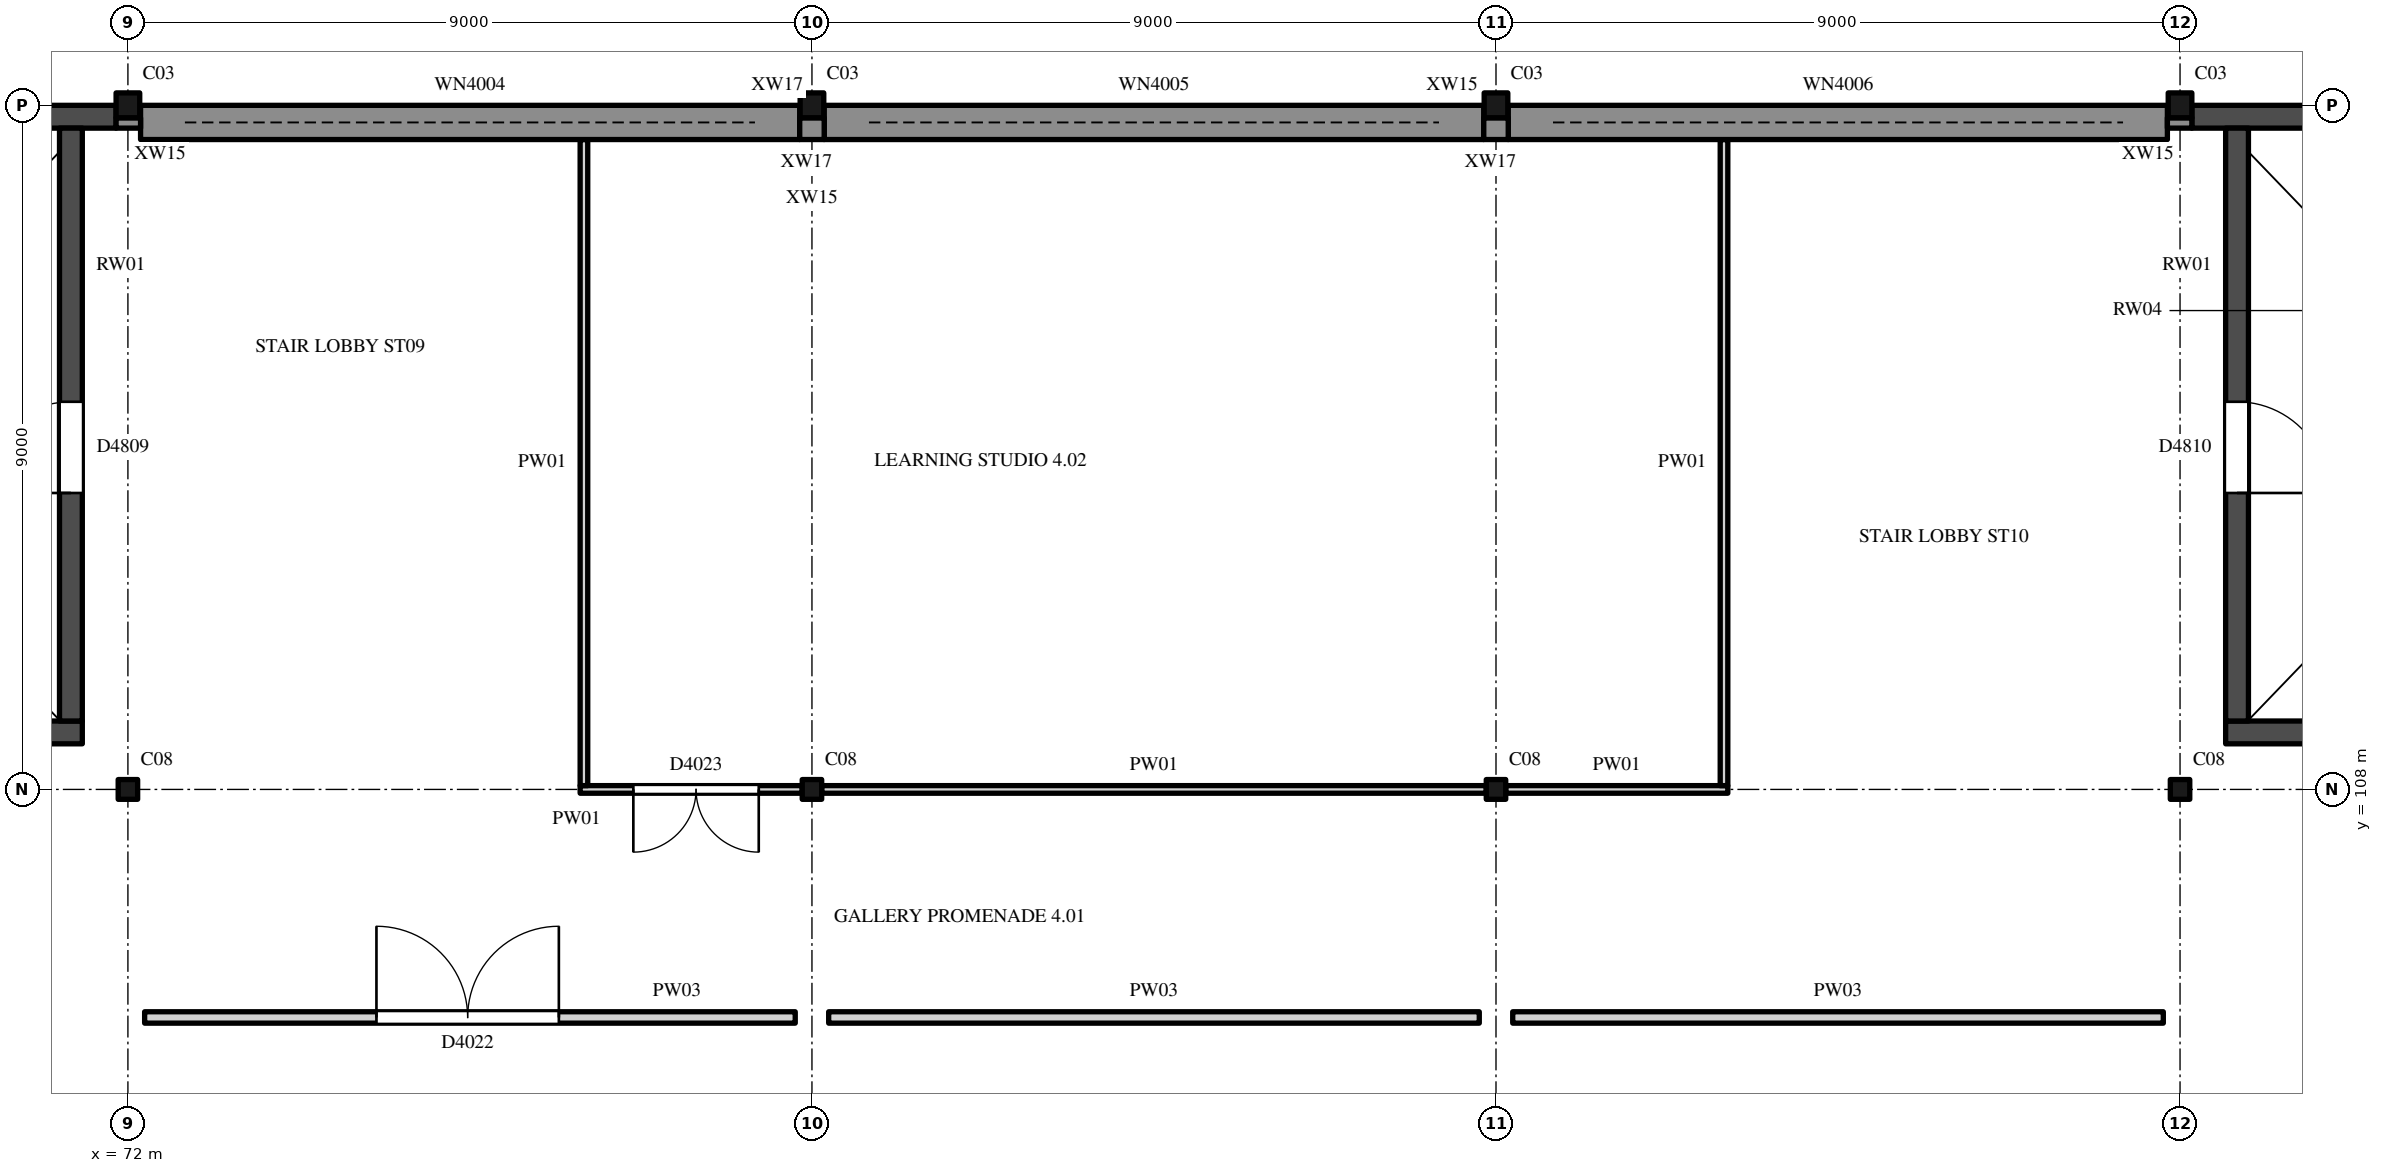
"""IFC4 building model, lengths in metres.
Left out: names, types, materials, properties, quantities, classifications, styles, units other than length and angle.
Written with IfcOpenShell. Run it as: python <this file> out.ifc"""

import sys

from ifc_helpers import new_model, si_unit, direction, frame, frame_2d, origin, origin_2d, place, context, subcontext, project, spatial, rectangle, i_section, extrude, element, fill, save


model = new_model("IFC4")
c1 = context("Model", 3, precision=1e-05, world=origin(), true_north=direction((0.0, 1.0)))
c2 = subcontext(c1, "Body", "Model", "MODEL_VIEW")
j1 = project(units=[si_unit("LENGTHUNIT", "METRE"), si_unit("PLANEANGLEUNIT", "RADIAN")], contexts=[c1])
p1 = place(None, origin())
s1 = spatial("IfcSite", under=j1, at=p1, CompositionType="ELEMENT")
p2 = place(p1, origin())
s2 = spatial("IfcBuilding", under=s1, at=p2, CompositionType="ELEMENT")
p3 = place(p2, frame((0.0, 0.0, 26.0)))
s3 = spatial("IfcBuildingStorey", under=s2, at=p3, CompositionType="ELEMENT", Elevation=26.0)
for number, where, z_axis, x_axis in (
    (1, (72.0, 108.0, 0.0), (0.0, 0.0, 1.0), (1.0, 0.0, 0.0)),
    (2, (81.0, 108.0, 0.0), (0.0, 0.0, 1.0), (1.0, 0.0, 0.0)),
    (3, (90.0, 108.0, 0.0), (0.0, 0.0, 1.0), (1.0, 0.0, 0.0)),
    (4, (99.0, 108.0, 0.0), (0.0, 0.0, 1.0), (1.0, 0.0, 0.0)),
):
    element("IfcColumn", number, at=place(p3, frame(where, z_axis=z_axis, x_axis=x_axis)), inside=s3, PredefinedType="COLUMN", context=c2, shape_type="SweptSolid", body=[
        extrude(i_section(OverallWidth=0.256, OverallDepth=0.26, WebThickness=0.01, FlangeThickness=0.017, FilletRadius=0.014, at=origin_2d()), origin(), (0.0, 0.0, 1.0), 5.0),
    ])
for number, where, z_axis, x_axis in (
    (5, (72.0, 117.0, 0.0), (0.0, 0.0, 1.0), (1.0, 0.0, 0.0)),
    (6, (81.0, 117.0, 0.0), (0.0, 0.0, 1.0), (1.0, 0.0, 0.0)),
    (7, (90.0, 117.0, 0.0), (0.0, 0.0, 1.0), (1.0, 0.0, 0.0)),
    (8, (99.0, 117.0, 0.0), (0.0, 0.0, 1.0), (1.0, 0.0, 0.0)),
):
    element("IfcColumn", number, at=place(p3, frame(where, z_axis=z_axis, x_axis=x_axis)), inside=s3, PredefinedType="COLUMN", context=c2, shape_type="SweptSolid", body=[
        extrude(i_section(OverallWidth=0.311, OverallDepth=0.327, WebThickness=0.016, FlangeThickness=0.025, FilletRadius=0.017, at=origin_2d()), origin(), (0.0, 0.0, 1.0), 5.0),
    ])
p4 = place(p3, frame((63.6, 108.75, 0.0), z_axis=(0.0, 0.0, 1.0), x_axis=(1.0, 0.0, 0.0)))
e9 = element("IfcWall", 9, at=p4, inside=s3, PredefinedType="SHEAR", context=c2, shape_type="SweptSolid", body=[
    extrude(rectangle(XDim=7.8, YDim=0.3, at=frame_2d((3.9, 0.0))), origin(), (0.0, 0.0, 1.0), 5.0),
])
p5 = place(p3, frame((63.156, 116.85, 0.0), z_axis=(0.0, 0.0, 1.0), x_axis=(1.0, 0.0, 0.0)))
e10 = element("IfcWall", 10, at=p5, inside=s3, PredefinedType="SHEAR", context=c2, shape_type="SweptSolid", body=[
    extrude(rectangle(XDim=8.689, YDim=0.3, at=frame_2d((4.344, 0.0))), origin(), (0.0, 0.0, 1.0), 5.0),
])
p6 = place(p3, frame((71.25, 108.9, 0.0), z_axis=(0.0, 0.0, 1.0), x_axis=(0.0, 1.0, 0.0)))
e11 = element("IfcWall", 11, at=p6, inside=s3, PredefinedType="SHEAR", context=c2, shape_type="SweptSolid", body=[
    extrude(rectangle(XDim=7.8, YDim=0.3, at=frame_2d((3.9, 0.0))), origin(), (0.0, 0.0, 1.0), 5.0),
])
p7 = place(p6, frame((3.0, 0.0, 0.0)))
e12 = element("IfcOpeningElement", 12, at=p7, cuts=e11, PredefinedType="OPENING", context=c2, shape_type="SweptSolid", body=[
    extrude(rectangle(XDim=1.2, YDim=2.1, at=frame_2d((0.6, 1.05))), frame((0.0, 0.16, 0.0), z_axis=(0.0, -1.0, 0.0), x_axis=(1.0, 0.0, 0.0)), (0.0, 0.0, 1.0), 0.32),
])
p8 = place(p3, frame((99.6, 108.75, 0.0), z_axis=(0.0, 0.0, 1.0), x_axis=(1.0, 0.0, 0.0)))
e13 = element("IfcWall", 13, at=p8, inside=s3, PredefinedType="SHEAR", context=c2, shape_type="SweptSolid", body=[
    extrude(rectangle(XDim=7.8, YDim=0.3, at=frame_2d((3.9, 0.0))), origin(), (0.0, 0.0, 1.0), 5.0),
])
p9 = place(p3, frame((99.156, 116.85, 0.0), z_axis=(0.0, 0.0, 1.0), x_axis=(1.0, 0.0, 0.0)))
e14 = element("IfcWall", 14, at=p9, inside=s3, PredefinedType="SHEAR", context=c2, shape_type="SweptSolid", body=[
    extrude(rectangle(XDim=8.689, YDim=0.3, at=frame_2d((4.344, 0.0))), origin(), (0.0, 0.0, 1.0), 5.0),
])
p10 = place(p3, frame((99.75, 108.9, 0.0), z_axis=(0.0, 0.0, 1.0), x_axis=(0.0, 1.0, 0.0)))
e15 = element("IfcWall", 15, at=p10, inside=s3, PredefinedType="SHEAR", context=c2, shape_type="SweptSolid", body=[
    extrude(rectangle(XDim=7.8, YDim=0.3, at=frame_2d((3.9, 0.0))), origin(), (0.0, 0.0, 1.0), 5.0),
])
p11 = place(p10, frame((3.0, 0.0, 0.0)))
e16 = element("IfcOpeningElement", 16, at=p11, cuts=e15, PredefinedType="OPENING", context=c2, shape_type="SweptSolid", body=[
    extrude(rectangle(XDim=1.2, YDim=2.1, at=frame_2d((0.6, 1.05))), frame((0.0, 0.16, 0.0), z_axis=(0.0, -1.0, 0.0), x_axis=(1.0, 0.0, 0.0)), (0.0, 0.0, 1.0), 0.32),
])
p12 = place(p3, frame((72.167, 116.775, 0.0), z_axis=(0.0, 0.0, 1.0), x_axis=(1.0, 0.0, 0.0)))
e17 = element("IfcWall", 17, at=p12, inside=s3, PredefinedType="SOLIDWALL", context=c2, shape_type="SweptSolid", body=[
    extrude(rectangle(XDim=8.673, YDim=0.45, at=frame_2d((4.336, 0.0))), origin(), (0.0, 0.0, 1.0), 4.518),
])
p13 = place(p12, frame((0.583, 0.0, 1.6)))
e18 = element("IfcOpeningElement", 18, at=p13, cuts=e17, PredefinedType="OPENING", context=c2, shape_type="SweptSolid", body=[
    extrude(rectangle(XDim=7.5, YDim=1.2, at=frame_2d((3.75, 0.6))), frame((0.0, 0.235, 0.0), z_axis=(0.0, -1.0, 0.0), x_axis=(1.0, 0.0, 0.0)), (0.0, 0.0, 1.0), 0.47),
])
p14 = place(p3, frame((81.161, 116.775, 0.0), z_axis=(0.0, 0.0, 1.0), x_axis=(1.0, 0.0, 0.0)))
e19 = element("IfcWall", 19, at=p14, inside=s3, PredefinedType="SOLIDWALL", context=c2, shape_type="SweptSolid", body=[
    extrude(rectangle(XDim=8.678, YDim=0.45, at=frame_2d((4.339, 0.0))), origin(), (0.0, 0.0, 1.0), 4.518),
])
p15 = place(p14, frame((0.589, 0.0, 1.6)))
e20 = element("IfcOpeningElement", 20, at=p15, cuts=e19, PredefinedType="OPENING", context=c2, shape_type="SweptSolid", body=[
    extrude(rectangle(XDim=7.5, YDim=1.2, at=frame_2d((3.75, 0.6))), frame((0.0, 0.235, 0.0), z_axis=(0.0, -1.0, 0.0), x_axis=(1.0, 0.0, 0.0)), (0.0, 0.0, 1.0), 0.47),
])
p16 = place(p3, frame((90.161, 116.775, 0.0), z_axis=(0.0, 0.0, 1.0), x_axis=(1.0, 0.0, 0.0)))
e21 = element("IfcWall", 21, at=p16, inside=s3, PredefinedType="SOLIDWALL", context=c2, shape_type="SweptSolid", body=[
    extrude(rectangle(XDim=8.673, YDim=0.45, at=frame_2d((4.336, 0.0))), origin(), (0.0, 0.0, 1.0), 4.518),
])
p17 = place(p16, frame((0.589, 0.0, 1.6)))
e22 = element("IfcOpeningElement", 22, at=p17, cuts=e21, PredefinedType="OPENING", context=c2, shape_type="SweptSolid", body=[
    extrude(rectangle(XDim=7.5, YDim=1.2, at=frame_2d((3.75, 0.6))), frame((0.0, 0.235, 0.0), z_axis=(0.0, -1.0, 0.0), x_axis=(1.0, 0.0, 0.0)), (0.0, 0.0, 1.0), 0.47),
])
p18 = place(p3, frame((71.844, 116.768, 0.0), z_axis=(0.0, 0.0, 1.0), x_axis=(1.0, 0.0, 0.0)))
e23 = element("IfcWall", 23, at=p18, inside=s3, PredefinedType="SOLIDWALL", context=c2, shape_type="SweptSolid", body=[
    extrude(rectangle(XDim=0.322, YDim=0.136, at=frame_2d((0.161, 0.0))), origin(), (0.0, 0.0, 1.0), 5.0),
])
for number, where, z_axis, x_axis in (
    (24, (80.839, 116.693, 0.0), (0.0, 0.0, 1.0), (1.0, 0.0, 0.0)),
    (25, (89.839, 116.693, 0.0), (0.0, 0.0, 1.0), (1.0, 0.0, 0.0)),
):
    element("IfcWall", number, at=place(p3, frame(where, z_axis=z_axis, x_axis=x_axis)), inside=s3, PredefinedType="SOLIDWALL", context=c2, shape_type="SweptSolid", body=[
        extrude(rectangle(XDim=0.322, YDim=0.286, at=frame_2d((0.161, 0.0))), origin(), (0.0, 0.0, 1.0), 4.518),
    ])
p19 = place(p3, frame((98.833, 116.768, 0.0), z_axis=(0.0, 0.0, 1.0), x_axis=(1.0, 0.0, 0.0)))
e26 = element("IfcWall", 26, at=p19, inside=s3, PredefinedType="SOLIDWALL", context=c2, shape_type="SweptSolid", body=[
    extrude(rectangle(XDim=0.322, YDim=0.136, at=frame_2d((0.161, 0.0))), origin(), (0.0, 0.0, 1.0), 5.0),
])
p20 = place(p3, frame((72.22, 105.0, 0.0), z_axis=(0.0, 0.0, 1.0), x_axis=(1.0, 0.0, 0.0)))
e27 = element("IfcWall", 27, at=p20, inside=s3, PredefinedType="PARTITIONING", context=c2, shape_type="SweptSolid", body=[
    extrude(rectangle(XDim=8.56, YDim=0.15, at=frame_2d((4.28, 0.0))), origin(), (0.0, 0.0, 1.0), 4.521),
])
p21 = place(p20, frame((3.05, 0.0, 0.0)))
e28 = element("IfcOpeningElement", 28, at=p21, cuts=e27, PredefinedType="OPENING", context=c2, shape_type="SweptSolid", body=[
    extrude(rectangle(XDim=2.4, YDim=3.0, at=frame_2d((1.2, 1.5))), frame((0.0, 0.085, 0.0), z_axis=(0.0, -1.0, 0.0), x_axis=(1.0, 0.0, 0.0)), (0.0, 0.0, 1.0), 0.17),
])
for number, where, z_axis, x_axis in (
    (29, (81.22, 105.0, 0.0), (0.0, 0.0, 1.0), (1.0, 0.0, 0.0)),
    (30, (90.22, 105.0, 0.0), (0.0, 0.0, 1.0), (1.0, 0.0, 0.0)),
):
    element("IfcWall", number, at=place(p3, frame(where, z_axis=z_axis, x_axis=x_axis)), inside=s3, PredefinedType="PARTITIONING", context=c2, shape_type="SweptSolid", body=[
        extrude(rectangle(XDim=8.56, YDim=0.15, at=frame_2d((4.28, 0.0))), origin(), (0.0, 0.0, 1.0), 4.521),
    ])
p22 = place(p3, frame((77.95, 108.0, 0.0), z_axis=(0.0, 0.0, 1.0), x_axis=(1.0, 0.0, 0.0)))
e31 = element("IfcWall", 31, at=p22, inside=s3, PredefinedType="PARTITIONING", context=c2, shape_type="SweptSolid", body=[
    extrude(rectangle(XDim=2.922, YDim=0.1, at=frame_2d((1.461, 0.0))), origin(), (0.0, 0.0, 1.0), 4.518),
])
p23 = place(p22, frame((0.7, 0.0, 0.0)))
e32 = element("IfcOpeningElement", 32, at=p23, cuts=e31, PredefinedType="OPENING", context=c2, shape_type="SweptSolid", body=[
    extrude(rectangle(XDim=1.65, YDim=2.1, at=frame_2d((0.825, 1.05))), frame((0.0, 0.06, 0.0), z_axis=(0.0, -1.0, 0.0), x_axis=(1.0, 0.0, 0.0)), (0.0, 0.0, 1.0), 0.12),
])
p24 = place(p3, frame((81.128, 108.0, 0.0), z_axis=(0.0, 0.0, 1.0), x_axis=(1.0, 0.0, 0.0)))
e33 = element("IfcWall", 33, at=p24, inside=s3, PredefinedType="PARTITIONING", context=c2, shape_type="SweptSolid", body=[
    extrude(rectangle(XDim=8.744, YDim=0.1, at=frame_2d((4.372, 0.0))), origin(), (0.0, 0.0, 1.0), 4.518),
])
p25 = place(p3, frame((90.128, 108.0, 0.0), z_axis=(0.0, 0.0, 1.0), x_axis=(1.0, 0.0, 0.0)))
e34 = element("IfcWall", 34, at=p25, inside=s3, PredefinedType="PARTITIONING", context=c2, shape_type="SweptSolid", body=[
    extrude(rectangle(XDim=2.922, YDim=0.1, at=frame_2d((1.461, 0.0))), origin(), (0.0, 0.0, 1.0), 4.518),
])
for number, where, z_axis, x_axis in (
    (35, (78.0, 108.05, 0.0), (0.0, 0.0, 1.0), (0.0, 1.0, 0.0)),
    (36, (93.0, 108.05, 0.0), (0.0, 0.0, 1.0), (0.0, 1.0, 0.0)),
):
    element("IfcWall", number, at=place(p3, frame(where, z_axis=z_axis, x_axis=x_axis)), inside=s3, PredefinedType="PARTITIONING", context=c2, shape_type="SweptSolid", body=[
        extrude(rectangle(XDim=8.5, YDim=0.1, at=frame_2d((4.25, 0.0))), origin(), (0.0, 0.0, 1.0), 4.825),
    ])
p26 = place(p7, origin())
e37 = element("IfcDoor", 37, at=p26, inside=s3, OperationType="SINGLE_SWING_RIGHT", PredefinedType="DOOR", context=c2, shape_type="SweptSolid", body=[
    extrude(rectangle(XDim=1.2, YDim=2.1, at=frame_2d((0.6, 1.05))), frame((0.0, 0.025, 0.0), z_axis=(0.0, -1.0, 0.0), x_axis=(1.0, 0.0, 0.0)), (0.0, 0.0, 1.0), 0.05),
])
fill(e12, e37)
p27 = place(p11, origin())
e38 = element("IfcDoor", 38, at=p27, inside=s3, OperationType="SINGLE_SWING_LEFT", PredefinedType="DOOR", context=c2, shape_type="SweptSolid", body=[
    extrude(rectangle(XDim=1.2, YDim=2.1, at=frame_2d((0.6, 1.05))), frame((0.0, 0.025, 0.0), z_axis=(0.0, -1.0, 0.0), x_axis=(1.0, 0.0, 0.0)), (0.0, 0.0, 1.0), 0.05),
])
fill(e16, e38)
p28 = place(p13, origin())
e39 = element("IfcWindow", 39, at=p28, inside=s3, PartitioningType="SINGLE_PANEL", PredefinedType="WINDOW", context=c2, shape_type="SweptSolid", body=[
    extrude(rectangle(XDim=7.5, YDim=1.2, at=frame_2d((3.75, 0.6))), frame((0.0, 0.03, 0.0), z_axis=(0.0, -1.0, 0.0), x_axis=(1.0, 0.0, 0.0)), (0.0, 0.0, 1.0), 0.06),
])
fill(e18, e39)
p29 = place(p15, origin())
e40 = element("IfcWindow", 40, at=p29, inside=s3, PartitioningType="SINGLE_PANEL", PredefinedType="WINDOW", context=c2, shape_type="SweptSolid", body=[
    extrude(rectangle(XDim=7.5, YDim=1.2, at=frame_2d((3.75, 0.6))), frame((0.0, 0.03, 0.0), z_axis=(0.0, -1.0, 0.0), x_axis=(1.0, 0.0, 0.0)), (0.0, 0.0, 1.0), 0.06),
])
fill(e20, e40)
p30 = place(p17, origin())
e41 = element("IfcWindow", 41, at=p30, inside=s3, PartitioningType="SINGLE_PANEL", PredefinedType="WINDOW", context=c2, shape_type="SweptSolid", body=[
    extrude(rectangle(XDim=7.5, YDim=1.2, at=frame_2d((3.75, 0.6))), frame((0.0, 0.03, 0.0), z_axis=(0.0, -1.0, 0.0), x_axis=(1.0, 0.0, 0.0)), (0.0, 0.0, 1.0), 0.06),
])
fill(e22, e41)
p31 = place(p21, origin())
e42 = element("IfcDoor", 42, at=p31, inside=s3, OperationType="DOUBLE_DOOR_SINGLE_SWING", PredefinedType="DOOR", context=c2, shape_type="SweptSolid", body=[
    extrude(rectangle(XDim=2.4, YDim=3.0, at=frame_2d((1.2, 1.5))), frame((0.0, 0.025, 0.0), z_axis=(0.0, -1.0, 0.0), x_axis=(1.0, 0.0, 0.0)), (0.0, 0.0, 1.0), 0.05),
])
fill(e28, e42)
p32 = place(p23, origin())
e43 = element("IfcDoor", 43, at=p32, inside=s3, OperationType="DOUBLE_DOOR_SINGLE_SWING", PredefinedType="DOOR", context=c2, shape_type="SweptSolid", body=[
    extrude(rectangle(XDim=1.65, YDim=2.1, at=frame_2d((0.825, 1.05))), frame((0.0, 0.025, 0.0), z_axis=(0.0, -1.0, 0.0), x_axis=(1.0, 0.0, 0.0)), (0.0, 0.0, 1.0), 0.05),
])
fill(e32, e43)
save(model, sys.argv[1])
